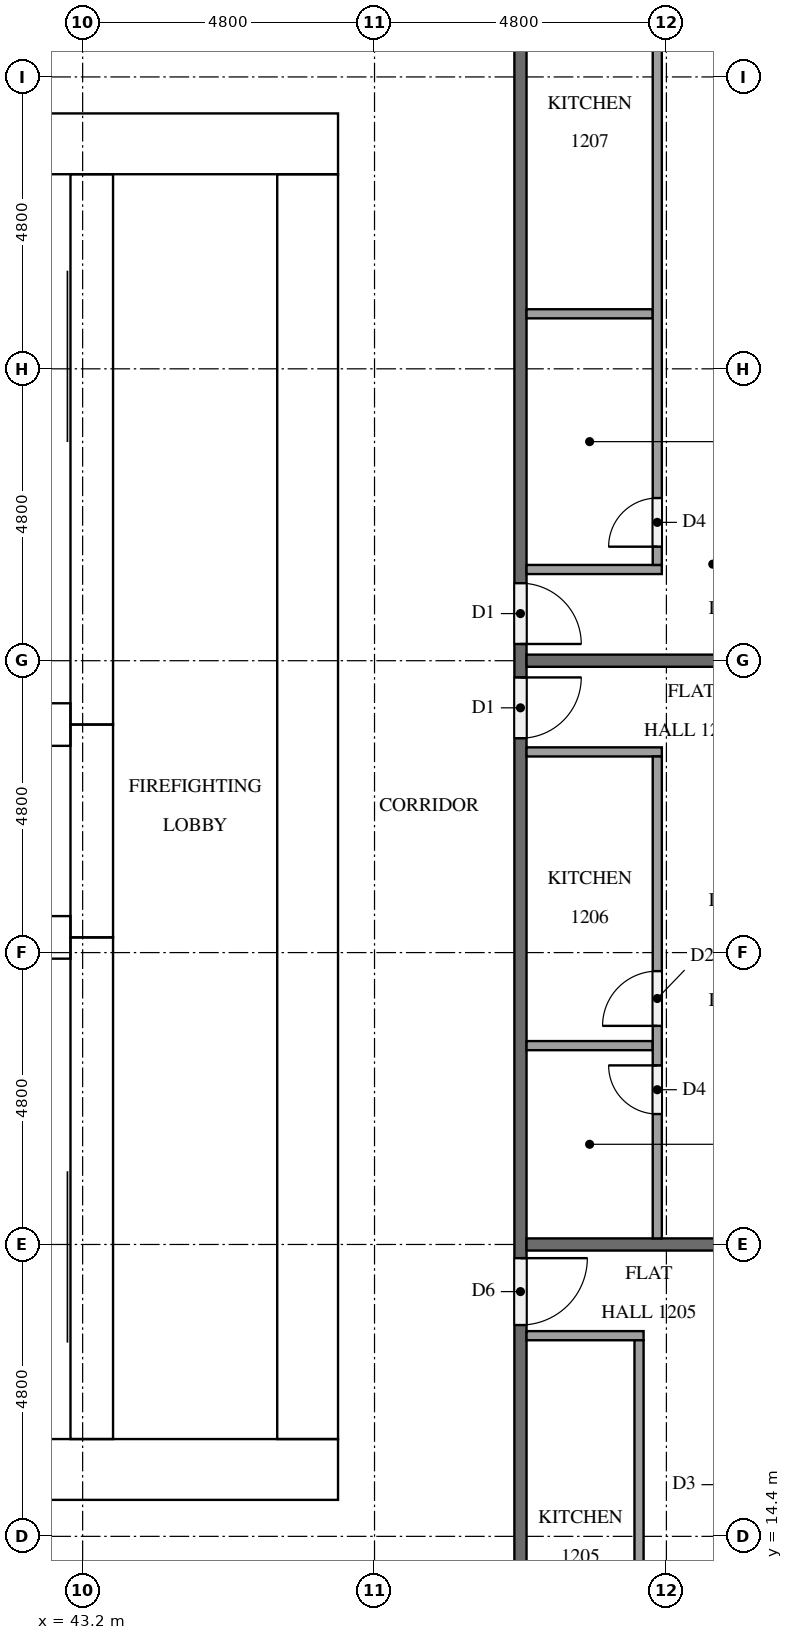
"""IFC4 building model, lengths in metres.
Left out: names, types, materials, properties, quantities, classifications, styles, units other than length and angle.
Written with IfcOpenShell. Run it as: python <this file> out.ifc"""

import sys

from ifc_helpers import new_model, si_unit, direction, frame, frame_2d, origin, place, context, subcontext, project, spatial, rectangle, extrude, element, fill, save


model = new_model("IFC4")
c1 = context("Model", 3, precision=1e-05, world=origin(), true_north=direction((0.0, 1.0)))
c2 = subcontext(c1, "Body", "Model", "MODEL_VIEW")
j1 = project(units=[si_unit("LENGTHUNIT", "METRE"), si_unit("PLANEANGLEUNIT", "RADIAN")], contexts=[c1])
p1 = place(None, origin())
s1 = spatial("IfcSite", under=j1, at=p1, CompositionType="ELEMENT")
p2 = place(p1, origin())
s2 = spatial("IfcBuilding", under=s1, at=p2, CompositionType="ELEMENT")
p3 = place(p2, frame((0.0, 0.0, 50.4)))
s3 = spatial("IfcBuildingStorey", under=s2, at=p3, CompositionType="ELEMENT", Elevation=50.4)
p4 = place(p3, frame((15.0, 15.5, 0.0), z_axis=(0.0, 0.0, 1.0), x_axis=(1.0, 0.0, 0.0)))
e1 = element("IfcWall", 1, at=p4, inside=s3, PredefinedType="SHEAR", context=c2, shape_type="SweptSolid", body=[
    extrude(rectangle(XDim=32.4, YDim=1.0, at=frame_2d((16.2, 0.0))), origin(), (0.0, 0.0, 1.0), 3.1),
])
p5 = place(p4, frame((15.3, 0.0, 0.0)))
e2 = element("IfcOpeningElement", 2, at=p5, cuts=e1, PredefinedType="OPENING", context=c2, shape_type="SweptSolid", body=[
    extrude(rectangle(XDim=1.8, YDim=2.1, at=frame_2d((0.9, 1.05))), frame((0.0, 0.51, 0.0), z_axis=(0.0, -1.0, 0.0), x_axis=(1.0, 0.0, 0.0)), (0.0, 0.0, 1.0), 1.02),
])
p6 = place(p3, frame((15.0, 37.3, 0.0), z_axis=(0.0, 0.0, 1.0), x_axis=(1.0, 0.0, 0.0)))
e3 = element("IfcWall", 3, at=p6, inside=s3, PredefinedType="SHEAR", context=c2, shape_type="SweptSolid", body=[
    extrude(rectangle(XDim=32.4, YDim=1.0, at=frame_2d((16.2, 0.0))), origin(), (0.0, 0.0, 1.0), 3.1),
])
p7 = place(p6, frame((15.3, 0.0, 0.0)))
e4 = element("IfcOpeningElement", 4, at=p7, cuts=e3, PredefinedType="OPENING", context=c2, shape_type="SweptSolid", body=[
    extrude(rectangle(XDim=1.8, YDim=2.1, at=frame_2d((0.9, 1.05))), frame((0.0, 0.51, 0.0), z_axis=(0.0, -1.0, 0.0), x_axis=(1.0, 0.0, 0.0)), (0.0, 0.0, 1.0), 1.02),
])
p8 = place(p6, frame((1.766, 0.0, 0.0)))
e5 = element("IfcOpeningElement", 5, at=p8, cuts=e3, PredefinedType="OPENING", context=c2, shape_type="SweptSolid", body=[
    extrude(rectangle(XDim=1.0, YDim=2.1, at=frame_2d((0.5, 1.05))), frame((0.0, 0.51, 0.0), z_axis=(0.0, -1.0, 0.0), x_axis=(1.0, 0.0, 0.0)), (0.0, 0.0, 1.0), 1.02),
])
p9 = place(p6, frame((5.241, 0.0, 0.0)))
e6 = element("IfcOpeningElement", 6, at=p9, cuts=e3, PredefinedType="OPENING", context=c2, shape_type="SweptSolid", body=[
    extrude(rectangle(XDim=1.0, YDim=2.1, at=frame_2d((0.5, 1.05))), frame((0.0, 0.51, 0.0), z_axis=(0.0, -1.0, 0.0), x_axis=(1.0, 0.0, 0.0)), (0.0, 0.0, 1.0), 1.02),
])
p10 = place(p3, frame((46.9, 16.0, 0.0), z_axis=(0.0, 0.0, 1.0), x_axis=(0.0, 1.0, 0.0)))
e7 = element("IfcWall", 7, at=p10, inside=s3, PredefinedType="SHEAR", context=c2, shape_type="SweptSolid", body=[
    extrude(rectangle(XDim=20.8, YDim=1.0, at=frame_2d((10.4, 0.0))), origin(), (0.0, 0.0, 1.0), 3.1),
])
p11 = place(p10, frame((10.1, 0.0, 0.0)))
e8 = element("IfcOpeningElement", 8, at=p11, cuts=e7, PredefinedType="OPENING", context=c2, shape_type="SweptSolid", body=[
    extrude(rectangle(XDim=1.2, YDim=2.1, at=frame_2d((0.6, 1.05))), frame((0.0, 0.51, 0.0), z_axis=(0.0, -1.0, 0.0), x_axis=(1.0, 0.0, 0.0)), (0.0, 0.0, 1.0), 1.02),
])
p12 = place(p3, frame((43.35, 16.0, 0.0), z_axis=(0.0, 0.0, 1.0), x_axis=(0.0, 1.0, 0.0)))
e9 = element("IfcWall", 9, at=p12, inside=s3, PredefinedType="SHEAR", context=c2, shape_type="SweptSolid", body=[
    extrude(rectangle(XDim=8.25, YDim=0.7, at=frame_2d((4.125, 0.0))), origin(), (0.0, 0.0, 1.0), 3.1),
])
p13 = place(p12, frame((0.2, 0.0, 0.0)))
e10 = element("IfcOpeningElement", 10, at=p13, cuts=e9, PredefinedType="OPENING", context=c2, shape_type="SweptSolid", body=[
    extrude(rectangle(XDim=1.2, YDim=2.1, at=frame_2d((0.6, 1.05))), frame((0.0, 0.36, 0.0), z_axis=(0.0, -1.0, 0.0), x_axis=(1.0, 0.0, 0.0)), (0.0, 0.0, 1.0), 0.72),
])
p14 = place(p3, frame((43.35, 24.25, 0.0), z_axis=(0.0, 0.0, 1.0), x_axis=(0.0, 1.0, 0.0)))
e11 = element("IfcWall", 11, at=p14, inside=s3, PredefinedType="SHEAR", context=c2, shape_type="SweptSolid", body=[
    extrude(rectangle(XDim=3.5, YDim=0.7, at=frame_2d((1.75, 0.0))), origin(), (0.0, 0.0, 1.0), 3.1),
])
p15 = place(p14, frame((1.2, 0.0, 0.0)))
e12 = element("IfcOpeningElement", 12, at=p15, cuts=e11, PredefinedType="OPENING", context=c2, shape_type="SweptSolid", body=[
    extrude(rectangle(XDim=1.1, YDim=2.1, at=frame_2d((0.55, 1.05))), frame((0.0, 0.36, 0.0), z_axis=(0.0, -1.0, 0.0), x_axis=(1.0, 0.0, 0.0)), (0.0, 0.0, 1.0), 0.72),
])
p16 = place(p3, frame((43.35, 27.75, 0.0), z_axis=(0.0, 0.0, 1.0), x_axis=(0.0, 1.0, 0.0)))
e13 = element("IfcWall", 13, at=p16, inside=s3, PredefinedType="SHEAR", context=c2, shape_type="SweptSolid", body=[
    extrude(rectangle(XDim=9.05, YDim=0.7, at=frame_2d((4.525, 0.0))), origin(), (0.0, 0.0, 1.0), 3.1),
])
p17 = place(p16, frame((7.65, 0.0, 0.0)))
e14 = element("IfcOpeningElement", 14, at=p17, cuts=e13, PredefinedType="OPENING", context=c2, shape_type="SweptSolid", body=[
    extrude(rectangle(XDim=1.2, YDim=2.1, at=frame_2d((0.6, 1.05))), frame((0.0, 0.36, 0.0), z_axis=(0.0, -1.0, 0.0), x_axis=(1.0, 0.0, 0.0)), (0.0, 0.0, 1.0), 0.72),
])
for number, where, z_axis, x_axis in (
    (15, (39.65, 24.25, 0.0), (0.0, 0.0, 1.0), (1.0, 0.0, 0.0)),
    (16, (39.65, 27.75, 0.0), (0.0, 0.0, 1.0), (1.0, 0.0, 0.0)),
):
    element("IfcWall", number, at=place(p3, frame(where, z_axis=z_axis, x_axis=x_axis)), inside=s3, PredefinedType="SHEAR", context=c2, shape_type="SweptSolid", body=[
        extrude(rectangle(XDim=3.35, YDim=0.7, at=frame_2d((1.675, 0.0))), origin(), (0.0, 0.0, 1.0), 3.1),
    ])
p18 = place(p3, frame((50.4, 40.7, 0.0), z_axis=(0.0, 0.0, 1.0), x_axis=(0.0, -1.0, 0.0)))
e17 = element("IfcWall", 17, at=p18, inside=s3, PredefinedType="PARTITIONING", context=c2, shape_type="SweptSolid", body=[
    extrude(rectangle(XDim=28.6, YDim=0.2, at=frame_2d((14.3, 0.0))), origin(), (0.0, 0.0, 1.0), 3.1),
])
p19 = place(p18, frame((21.725, 0.0, 0.0)))
e18 = element("IfcOpeningElement", 18, at=p19, cuts=e17, PredefinedType="OPENING", context=c2, shape_type="SweptSolid", body=[
    extrude(rectangle(XDim=1.1, YDim=2.1, at=frame_2d((0.55, 1.05))), frame((0.0, 0.11, 0.0), z_axis=(0.0, -1.0, 0.0), x_axis=(1.0, 0.0, 0.0)), (0.0, 0.0, 1.0), 0.22),
])
p20 = place(p18, frame((12.175, 0.0, 0.0)))
e19 = element("IfcOpeningElement", 19, at=p20, cuts=e17, PredefinedType="OPENING", context=c2, shape_type="SweptSolid", body=[
    extrude(rectangle(XDim=1.0, YDim=2.1, at=frame_2d((0.5, 1.05))), frame((0.0, 0.11, 0.0), z_axis=(0.0, -1.0, 0.0), x_axis=(1.0, 0.0, 0.0)), (0.0, 0.0, 1.0), 0.22),
])
p21 = place(p18, frame((10.625, 0.0, 0.0)))
e20 = element("IfcOpeningElement", 20, at=p21, cuts=e17, PredefinedType="OPENING", context=c2, shape_type="SweptSolid", body=[
    extrude(rectangle(XDim=1.0, YDim=2.1, at=frame_2d((0.5, 1.05))), frame((0.0, 0.11, 0.0), z_axis=(0.0, -1.0, 0.0), x_axis=(1.0, 0.0, 0.0)), (0.0, 0.0, 1.0), 0.22),
])
for number, where, z_axis, x_axis in (
    (21, (50.5, 19.2, 0.0), (0.0, 0.0, 1.0), (1.0, 0.0, 0.0)),
    (22, (50.5, 28.8, 0.0), (0.0, 0.0, 1.0), (1.0, 0.0, 0.0)),
):
    element("IfcWall", number, at=place(p3, frame(where, z_axis=z_axis, x_axis=x_axis)), inside=s3, PredefinedType="PARTITIONING", context=c2, shape_type="SweptSolid", body=[
        extrude(rectangle(XDim=7.0, YDim=0.2, at=frame_2d((3.5, 0.0))), origin(), (0.0, 0.0, 1.0), 3.1),
    ])
p22 = place(p3, frame((50.5, 17.7, 0.0), z_axis=(0.0, 0.0, 1.0), x_axis=(1.0, 0.0, 0.0)))
e23 = element("IfcWall", 23, at=p22, inside=s3, PredefinedType="PARTITIONING", context=c2, shape_type="SweptSolid", body=[
    extrude(rectangle(XDim=1.925, YDim=0.15, at=frame_2d((0.962, 0.0))), origin(), (0.0, 0.0, 1.0), 3.1),
])
p23 = place(p3, frame((52.35, 0.625, 0.0), z_axis=(0.0, 0.0, 1.0), x_axis=(0.0, 1.0, 0.0)))
e24 = element("IfcWall", 24, at=p23, inside=s3, PredefinedType="PARTITIONING", context=c2, shape_type="SweptSolid", body=[
    extrude(rectangle(XDim=17.0, YDim=0.15, at=frame_2d((8.5, 0.0))), origin(), (0.0, 0.0, 1.0), 3.1),
])
p24 = place(p23, frame((10.753, 0.0, 0.0)))
e25 = element("IfcOpeningElement", 25, at=p24, cuts=e24, PredefinedType="OPENING", context=c2, shape_type="SweptSolid", body=[
    extrude(rectangle(XDim=0.9, YDim=2.1, at=frame_2d((0.45, 1.05))), frame((0.0, 0.085, 0.0), z_axis=(0.0, -1.0, 0.0), x_axis=(1.0, 0.0, 0.0)), (0.0, 0.0, 1.0), 0.17),
])
p25 = place(p23, frame((9.303, 0.0, 0.0)))
e26 = element("IfcOpeningElement", 26, at=p25, cuts=e24, PredefinedType="OPENING", context=c2, shape_type="SweptSolid", body=[
    extrude(rectangle(XDim=0.8, YDim=2.1, at=frame_2d((0.4, 1.05))), frame((0.0, 0.085, 0.0), z_axis=(0.0, -1.0, 0.0), x_axis=(1.0, 0.0, 0.0)), (0.0, 0.0, 1.0), 0.17),
])
p26 = place(p23, frame((4.181, 0.0, 0.0)))
e27 = element("IfcOpeningElement", 27, at=p26, cuts=e24, PredefinedType="OPENING", context=c2, shape_type="SweptSolid", body=[
    extrude(rectangle(XDim=0.8, YDim=2.1, at=frame_2d((0.4, 1.05))), frame((0.0, 0.085, 0.0), z_axis=(0.0, -1.0, 0.0), x_axis=(1.0, 0.0, 0.0)), (0.0, 0.0, 1.0), 0.17),
])
p27 = place(p23, frame((2.631, 0.0, 0.0)))
e28 = element("IfcOpeningElement", 28, at=p27, cuts=e24, PredefinedType="OPENING", context=c2, shape_type="SweptSolid", body=[
    extrude(rectangle(XDim=0.9, YDim=2.1, at=frame_2d((0.45, 1.05))), frame((0.0, 0.085, 0.0), z_axis=(0.0, -1.0, 0.0), x_axis=(1.0, 0.0, 0.0)), (0.0, 0.0, 1.0), 0.17),
])
p28 = place(p3, frame((50.5, 22.47, 0.0), z_axis=(0.0, 0.0, 1.0), x_axis=(1.0, 0.0, 0.0)))
e29 = element("IfcWall", 29, at=p28, inside=s3, PredefinedType="PARTITIONING", context=c2, shape_type="SweptSolid", body=[
    extrude(rectangle(XDim=2.075, YDim=0.15, at=frame_2d((1.038, 0.0))), origin(), (0.0, 0.0, 1.0), 3.1),
])
p29 = place(p3, frame((50.5, 27.3, 0.0), z_axis=(0.0, 0.0, 1.0), x_axis=(1.0, 0.0, 0.0)))
e30 = element("IfcWall", 30, at=p29, inside=s3, PredefinedType="PARTITIONING", context=c2, shape_type="SweptSolid", body=[
    extrude(rectangle(XDim=2.225, YDim=0.15, at=frame_2d((1.113, 0.0))), origin(), (0.0, 0.0, 1.0), 3.1),
])
p30 = place(p3, frame((52.65, 19.3, 0.0), z_axis=(0.0, 0.0, 1.0), x_axis=(0.0, 1.0, 0.0)))
e31 = element("IfcWall", 31, at=p30, inside=s3, PredefinedType="PARTITIONING", context=c2, shape_type="SweptSolid", body=[
    extrude(rectangle(XDim=7.925, YDim=0.15, at=frame_2d((3.962, 0.0))), origin(), (0.0, 0.0, 1.0), 3.1),
])
p31 = place(p30, frame((3.495, 0.0, 0.0)))
e32 = element("IfcOpeningElement", 32, at=p31, cuts=e31, PredefinedType="OPENING", context=c2, shape_type="SweptSolid", body=[
    extrude(rectangle(XDim=0.9, YDim=2.1, at=frame_2d((0.45, 1.05))), frame((0.0, 0.085, 0.0), z_axis=(0.0, -1.0, 0.0), x_axis=(1.0, 0.0, 0.0)), (0.0, 0.0, 1.0), 0.17),
])
p32 = place(p30, frame((2.045, 0.0, 0.0)))
e33 = element("IfcOpeningElement", 33, at=p32, cuts=e31, PredefinedType="OPENING", context=c2, shape_type="SweptSolid", body=[
    extrude(rectangle(XDim=0.8, YDim=2.1, at=frame_2d((0.4, 1.05))), frame((0.0, 0.085, 0.0), z_axis=(0.0, -1.0, 0.0), x_axis=(1.0, 0.0, 0.0)), (0.0, 0.0, 1.0), 0.17),
])
p33 = place(p3, frame((50.5, 34.505, 0.0), z_axis=(0.0, 0.0, 1.0), x_axis=(1.0, 0.0, 0.0)))
e34 = element("IfcWall", 34, at=p33, inside=s3, PredefinedType="PARTITIONING", context=c2, shape_type="SweptSolid", body=[
    extrude(rectangle(XDim=2.075, YDim=0.15, at=frame_2d((1.038, 0.0))), origin(), (0.0, 0.0, 1.0), 3.1),
])
p34 = place(p3, frame((50.5, 30.3, 0.0), z_axis=(0.0, 0.0, 1.0), x_axis=(1.0, 0.0, 0.0)))
e35 = element("IfcWall", 35, at=p34, inside=s3, PredefinedType="PARTITIONING", context=c2, shape_type="SweptSolid", body=[
    extrude(rectangle(XDim=2.225, YDim=0.15, at=frame_2d((1.113, 0.0))), origin(), (0.0, 0.0, 1.0), 3.1),
])
p35 = place(p3, frame((52.65, 30.375, 0.0), z_axis=(0.0, 0.0, 1.0), x_axis=(0.0, 1.0, 0.0)))
e36 = element("IfcWall", 36, at=p35, inside=s3, PredefinedType="PARTITIONING", context=c2, shape_type="SweptSolid", body=[
    extrude(rectangle(XDim=10.325, YDim=0.15, at=frame_2d((5.163, 0.0))), origin(), (0.0, 0.0, 1.0), 3.1),
])
p36 = place(p35, frame((0.3, 0.0, 0.0)))
e37 = element("IfcOpeningElement", 37, at=p36, cuts=e36, PredefinedType="OPENING", context=c2, shape_type="SweptSolid", body=[
    extrude(rectangle(XDim=0.8, YDim=2.1, at=frame_2d((0.4, 1.05))), frame((0.0, 0.085, 0.0), z_axis=(0.0, -1.0, 0.0), x_axis=(1.0, 0.0, 0.0)), (0.0, 0.0, 1.0), 0.17),
])
p37 = place(p35, frame((9.075, 0.0, 0.0)))
e38 = element("IfcOpeningElement", 38, at=p37, cuts=e36, PredefinedType="OPENING", context=c2, shape_type="SweptSolid", body=[
    extrude(rectangle(XDim=0.9, YDim=2.1, at=frame_2d((0.45, 1.05))), frame((0.0, 0.085, 0.0), z_axis=(0.0, -1.0, 0.0), x_axis=(1.0, 0.0, 0.0)), (0.0, 0.0, 1.0), 0.17),
])
p38 = place(p15, origin())
e39 = element("IfcDoor", 39, at=p38, inside=s3, OperationType="DOUBLE_DOOR_SLIDING", PredefinedType="DOOR", context=c2, shape_type="SweptSolid", body=[
    extrude(rectangle(XDim=1.1, YDim=2.1, at=frame_2d((0.55, 1.05))), frame((0.0, 0.025, 0.0), z_axis=(0.0, -1.0, 0.0), x_axis=(1.0, 0.0, 0.0)), (0.0, 0.0, 1.0), 0.05),
])
fill(e12, e39)
p39 = place(p13, origin())
e40 = element("IfcDoor", 40, at=p39, inside=s3, OperationType="SINGLE_SWING_LEFT", PredefinedType="DOOR", context=c2, shape_type="SweptSolid", body=[
    extrude(rectangle(XDim=1.2, YDim=2.1, at=frame_2d((0.6, 1.05))), frame((0.0, 0.025, 0.0), z_axis=(0.0, -1.0, 0.0), x_axis=(1.0, 0.0, 0.0)), (0.0, 0.0, 1.0), 0.05),
])
fill(e10, e40)
p40 = place(p17, origin())
e41 = element("IfcDoor", 41, at=p40, inside=s3, OperationType="SINGLE_SWING_RIGHT", PredefinedType="DOOR", context=c2, shape_type="SweptSolid", body=[
    extrude(rectangle(XDim=1.2, YDim=2.1, at=frame_2d((0.6, 1.05))), frame((0.0, 0.025, 0.0), z_axis=(0.0, -1.0, 0.0), x_axis=(1.0, 0.0, 0.0)), (0.0, 0.0, 1.0), 0.05),
])
fill(e14, e41)
p41 = place(p11, origin())
e42 = element("IfcDoor", 42, at=p41, inside=s3, OperationType="SINGLE_SWING_RIGHT", PredefinedType="DOOR", context=c2, shape_type="SweptSolid", body=[
    extrude(rectangle(XDim=1.2, YDim=2.1, at=frame_2d((0.6, 1.05))), frame((0.0, 0.025, 0.0), z_axis=(0.0, -1.0, 0.0), x_axis=(1.0, 0.0, 0.0)), (0.0, 0.0, 1.0), 0.05),
])
fill(e8, e42)
p42 = place(p19, origin())
e43 = element("IfcDoor", 43, at=p42, inside=s3, OperationType="SINGLE_SWING_LEFT", PredefinedType="DOOR", context=c2, shape_type="SweptSolid", body=[
    extrude(rectangle(XDim=1.1, YDim=2.1, at=frame_2d((0.55, 1.05))), frame((0.0, 0.025, 0.0), z_axis=(0.0, -1.0, 0.0), x_axis=(1.0, 0.0, 0.0)), (0.0, 0.0, 1.0), 0.05),
])
fill(e18, e43)
p43 = place(p20, origin())
e44 = element("IfcDoor", 44, at=p43, inside=s3, OperationType="SINGLE_SWING_LEFT", PredefinedType="DOOR", context=c2, shape_type="SweptSolid", body=[
    extrude(rectangle(XDim=1.0, YDim=2.1, at=frame_2d((0.5, 1.05))), frame((0.0, 0.025, 0.0), z_axis=(0.0, -1.0, 0.0), x_axis=(1.0, 0.0, 0.0)), (0.0, 0.0, 1.0), 0.05),
])
fill(e19, e44)
p44 = place(p21, origin())
e45 = element("IfcDoor", 45, at=p44, inside=s3, OperationType="SINGLE_SWING_RIGHT", PredefinedType="DOOR", context=c2, shape_type="SweptSolid", body=[
    extrude(rectangle(XDim=1.0, YDim=2.1, at=frame_2d((0.5, 1.05))), frame((0.0, 0.025, 0.0), z_axis=(0.0, -1.0, 0.0), x_axis=(1.0, 0.0, 0.0)), (0.0, 0.0, 1.0), 0.05),
])
fill(e20, e45)
p45 = place(p31, origin())
e46 = element("IfcDoor", 46, at=p45, inside=s3, OperationType="SINGLE_SWING_LEFT", PredefinedType="DOOR", context=c2, shape_type="SweptSolid", body=[
    extrude(rectangle(XDim=0.9, YDim=2.1, at=frame_2d((0.45, 1.05))), frame((0.0, 0.025, 0.0), z_axis=(0.0, -1.0, 0.0), x_axis=(1.0, 0.0, 0.0)), (0.0, 0.0, 1.0), 0.05),
])
fill(e32, e46)
p46 = place(p32, origin())
e47 = element("IfcDoor", 47, at=p46, inside=s3, OperationType="SINGLE_SWING_RIGHT", PredefinedType="DOOR", context=c2, shape_type="SweptSolid", body=[
    extrude(rectangle(XDim=0.8, YDim=2.1, at=frame_2d((0.4, 1.05))), frame((0.0, 0.025, 0.0), z_axis=(0.0, -1.0, 0.0), x_axis=(1.0, 0.0, 0.0)), (0.0, 0.0, 1.0), 0.05),
])
fill(e33, e47)
p47 = place(p36, origin())
e48 = element("IfcDoor", 48, at=p47, inside=s3, OperationType="SINGLE_SWING_LEFT", PredefinedType="DOOR", context=c2, shape_type="SweptSolid", body=[
    extrude(rectangle(XDim=0.8, YDim=2.1, at=frame_2d((0.4, 1.05))), frame((0.0, 0.025, 0.0), z_axis=(0.0, -1.0, 0.0), x_axis=(1.0, 0.0, 0.0)), (0.0, 0.0, 1.0), 0.05),
])
fill(e37, e48)
save(model, sys.argv[1])
